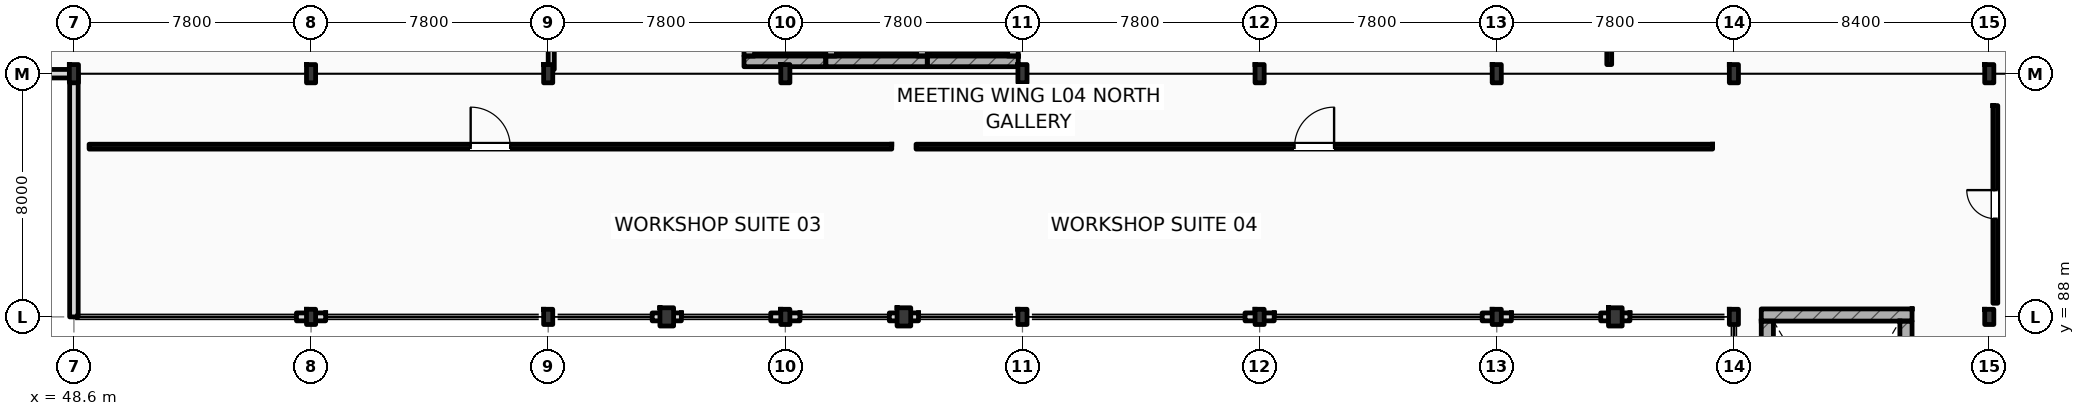
"""IFC4 building model, lengths in metres.
Left out: names, types, materials, properties, quantities, classifications, styles, units other than length and angle.
Written with IfcOpenShell. Run it as: python <this file> out.ifc"""

import sys

from ifc_helpers import new_model, si_unit, direction, frame, frame_2d, origin, origin_2d, place, context, subcontext, project, spatial, rectangle, i_section, extrude, element, fill, save


model = new_model("IFC4")
c1 = context("Model", 3, precision=1e-05, world=origin(), true_north=direction((0.0, 1.0)))
c2 = subcontext(c1, "Body", "Model", "MODEL_VIEW")
j1 = project(units=[si_unit("LENGTHUNIT", "METRE"), si_unit("PLANEANGLEUNIT", "RADIAN")], contexts=[c1])
p1 = place(None, origin())
s1 = spatial("IfcSite", under=j1, at=p1, CompositionType="ELEMENT")
p2 = place(p1, origin())
s2 = spatial("IfcBuilding", under=s1, at=p2, CompositionType="ELEMENT")
p3 = place(p2, frame((0.0, 0.0, 20.4)))
s3 = spatial("IfcBuildingStorey", under=s2, at=p3, CompositionType="ELEMENT", Elevation=20.4)
for number, where, z_axis, x_axis in (
    (1, (48.6, 96.0, 0.0), (0.0, 0.0, 1.0), (1.0, 0.0, 0.0)),
    (2, (56.4, 96.0, 0.0), (0.0, 0.0, 1.0), (1.0, 0.0, 0.0)),
    (3, (64.2, 96.0, 0.0), (0.0, 0.0, 1.0), (1.0, 0.0, 0.0)),
    (4, (72.0, 96.0, 0.0), (0.0, 0.0, 1.0), (1.0, 0.0, 0.0)),
    (5, (79.8, 96.0, 0.0), (0.0, 0.0, 1.0), (1.0, 0.0, 0.0)),
    (6, (87.6, 96.0, 0.0), (0.0, 0.0, 1.0), (1.0, 0.0, 0.0)),
    (7, (95.4, 96.0, 0.0), (0.0, 0.0, 1.0), (1.0, 0.0, 0.0)),
    (8, (103.2, 96.0, 0.0), (0.0, 0.0, 1.0), (1.0, 0.0, 0.0)),
    (9, (111.6, 96.0, 0.0), (0.0, 0.0, 1.0), (1.0, 0.0, 0.0)),
):
    element("IfcColumn", number, at=place(p3, frame(where, z_axis=z_axis, x_axis=x_axis)), inside=s3, PredefinedType="COLUMN", context=c2, shape_type="SweptSolid", body=[
        extrude(i_section(OverallWidth=0.3, OverallDepth=0.6, WebThickness=0.015, FlangeThickness=0.03, FilletRadius=0.027, at=origin_2d()), origin(), (0.0, 0.0, 1.0), 4.2),
    ])
for number, where, z_axis, x_axis in (
    (10, (56.4, 88.0, 0.0), (0.0, 0.0, 1.0), (1.0, 0.0, 0.0)),
    (11, (64.2, 88.0, 0.0), (0.0, 0.0, 1.0), (1.0, 0.0, 0.0)),
    (12, (72.0, 88.0, 0.0), (0.0, 0.0, 1.0), (1.0, 0.0, 0.0)),
    (13, (79.8, 88.0, 0.0), (0.0, 0.0, 1.0), (1.0, 0.0, 0.0)),
    (14, (87.6, 88.0, 0.0), (0.0, 0.0, 1.0), (1.0, 0.0, 0.0)),
    (15, (95.4, 88.0, 0.0), (0.0, 0.0, 1.0), (1.0, 0.0, 0.0)),
    (16, (103.2, 88.0, 0.0), (0.0, 0.0, 1.0), (1.0, 0.0, 0.0)),
    (17, (111.6, 88.0, 0.0), (0.0, 0.0, 1.0), (1.0, 0.0, 0.0)),
):
    element("IfcColumn", number, at=place(p3, frame(where, z_axis=z_axis, x_axis=x_axis)), inside=s3, PredefinedType="COLUMN", context=c2, shape_type="SweptSolid", body=[
        extrude(i_section(OverallWidth=0.3, OverallDepth=0.5, WebThickness=0.014, FlangeThickness=0.028, FilletRadius=0.027, at=origin_2d()), origin(), (0.0, 0.0, 1.0), 4.2),
    ])
for number, where, z_axis, x_axis in (
    (18, (68.1, 88.0, 0.0), (0.0, 0.0, 1.0), (1.0, 0.0, 0.0)),
    (19, (75.9, 88.0, 0.0), (0.0, 0.0, 1.0), (1.0, 0.0, 0.0)),
    (20, (99.3, 88.0, 0.0), (0.0, 0.0, 1.0), (1.0, 0.0, 0.0)),
):
    element("IfcColumn", number, at=place(p3, frame(where, z_axis=z_axis, x_axis=x_axis)), inside=s3, PredefinedType="PILASTER", context=c2, shape_type="SweptSolid", body=[
        extrude(rectangle(XDim=0.45, YDim=0.6, at=origin_2d()), origin(), (0.0, 0.0, 1.0), 4.2),
    ])
p4 = place(p3, frame((104.1, 88.062, 0.0), z_axis=(0.0, 0.0, 1.0), x_axis=(1.0, 0.0, 0.0)))
e21 = element("IfcWall", 21, at=p4, inside=s3, PredefinedType="SHEAR", context=c2, shape_type="SweptSolid", body=[
    extrude(rectangle(XDim=4.96, YDim=0.4, at=frame_2d((2.48, 0.0))), origin(), (0.0, 0.0, 1.0), 4.2),
])
p5 = place(p3, frame((104.3, 78.75, 0.0), z_axis=(0.0, 0.0, 1.0), x_axis=(0.0, 1.0, 0.0)))
e22 = element("IfcWall", 22, at=p5, inside=s3, PredefinedType="SHEAR", context=c2, shape_type="SweptSolid", body=[
    extrude(rectangle(XDim=9.112, YDim=0.4, at=frame_2d((4.556, 0.0))), origin(), (0.0, 0.0, 1.0), 4.2),
])
p6 = place(p3, frame((108.86, 78.75, 0.0), z_axis=(0.0, 0.0, 1.0), x_axis=(0.0, 1.0, 0.0)))
e23 = element("IfcWall", 23, at=p6, inside=s3, PredefinedType="SHEAR", context=c2, shape_type="SweptSolid", body=[
    extrude(rectangle(XDim=9.112, YDim=0.4, at=frame_2d((4.556, 0.0))), origin(), (0.0, 0.0, 1.0), 4.2),
])
p7 = place(p6, frame((0.44, 0.0, 0.0)))
e24 = element("IfcOpeningElement", 24, at=p7, cuts=e23, PredefinedType="OPENING", context=c2, shape_type="SweptSolid", body=[
    extrude(rectangle(XDim=1.1, YDim=2.2, at=frame_2d((0.55, 1.1))), frame((0.0, 0.21, 0.0), z_axis=(0.0, -1.0, 0.0), x_axis=(1.0, 0.0, 0.0)), (0.0, 0.0, 1.0), 0.42),
])
for number, where, z_axis, x_axis in (
    (25, (55.92, 88.0, 0.0), (0.0, 0.0, 1.0), (1.0, 0.0, 0.0)),
    (26, (67.62, 88.0, 0.0), (0.0, 0.0, 1.0), (1.0, 0.0, 0.0)),
    (27, (71.52, 88.0, 0.0), (0.0, 0.0, 1.0), (1.0, 0.0, 0.0)),
    (28, (75.42, 88.0, 0.0), (0.0, 0.0, 1.0), (1.0, 0.0, 0.0)),
    (29, (87.12, 88.0, 0.0), (0.0, 0.0, 1.0), (1.0, 0.0, 0.0)),
    (30, (94.92, 88.0, 0.0), (0.0, 0.0, 1.0), (1.0, 0.0, 0.0)),
    (31, (98.82, 88.0, 0.0), (0.0, 0.0, 1.0), (1.0, 0.0, 0.0)),
):
    element("IfcWall", number, at=place(p3, frame(where, z_axis=z_axis, x_axis=x_axis)), inside=s3, PredefinedType="STANDARD", context=c2, shape_type="SweptSolid", body=[
        extrude(rectangle(XDim=0.96, YDim=0.26, at=frame_2d((0.48, 0.0))), origin(), (0.0, 0.0, 1.0), 3.48),
    ])
p8 = place(p3, frame((48.6, 88.0, 0.0), z_axis=(0.0, 0.0, 1.0), x_axis=(0.0, 1.0, 0.0)))
e32 = element("IfcWall", 32, at=p8, inside=s3, PredefinedType="STANDARD", context=c2, shape_type="SweptSolid", body=[
    extrude(rectangle(XDim=8.0, YDim=0.28, at=frame_2d((4.0, 0.0))), origin(), (0.0, 0.0, 1.0), 3.94),
])
p9 = place(p3, frame((25.2, 96.0, 0.0), z_axis=(0.0, 0.0, 1.0), x_axis=(1.0, 0.0, 0.0)))
e33 = element("IfcWall", 33, at=p9, inside=s3, PredefinedType="STANDARD", context=c2, shape_type="SweptSolid", body=[
    extrude(rectangle(XDim=23.4, YDim=0.28, at=frame_2d((11.7, 0.0))), origin(), (0.0, 0.0, 1.0), 3.48),
])
p10 = place(p3, frame((70.64, 96.405, 0.0), z_axis=(0.0, 0.0, 1.0), x_axis=(1.0, 0.0, 0.0)))
e34 = element("IfcWall", 34, at=p10, inside=s3, PredefinedType="SHEAR", context=c2, shape_type="SweptSolid", body=[
    extrude(rectangle(XDim=2.69, YDim=0.35, at=frame_2d((1.345, 0.0))), origin(), (0.0, 0.0, 1.0), 3.94),
])
p11 = place(p3, frame((70.815, 96.58, 0.0), z_axis=(0.0, 0.0, 1.0), x_axis=(0.0, 1.0, 0.0)))
e35 = element("IfcWall", 35, at=p11, inside=s3, PredefinedType="SHEAR", context=c2, shape_type="SweptSolid", body=[
    extrude(rectangle(XDim=1.84, YDim=0.35, at=frame_2d((0.92, 0.0))), origin(), (0.0, 0.0, 1.0), 3.94),
])
p12 = place(p3, frame((73.33, 96.405, 0.0), z_axis=(0.0, 0.0, 1.0), x_axis=(1.0, 0.0, 0.0)))
e36 = element("IfcWall", 36, at=p12, inside=s3, PredefinedType="SHEAR", context=c2, shape_type="SweptSolid", body=[
    extrude(rectangle(XDim=3.34, YDim=0.35, at=frame_2d((1.67, 0.0))), origin(), (0.0, 0.0, 1.0), 3.94),
])
for number, where, z_axis, x_axis in (
    (37, (73.505, 96.58, 0.0), (0.0, 0.0, 1.0), (0.0, 1.0, 0.0)),
    (38, (76.495, 96.58, 0.0), (0.0, 0.0, 1.0), (0.0, 1.0, 0.0)),
):
    element("IfcWall", number, at=place(p3, frame(where, z_axis=z_axis, x_axis=x_axis)), inside=s3, PredefinedType="SHEAR", context=c2, shape_type="SweptSolid", body=[
        extrude(rectangle(XDim=1.84, YDim=0.35, at=frame_2d((0.92, 0.0))), origin(), (0.0, 0.0, 1.0), 3.94),
    ])
p13 = place(p3, frame((76.67, 96.405, 0.0), z_axis=(0.0, 0.0, 1.0), x_axis=(1.0, 0.0, 0.0)))
e39 = element("IfcWall", 39, at=p13, inside=s3, PredefinedType="SHEAR", context=c2, shape_type="SweptSolid", body=[
    extrude(rectangle(XDim=2.99, YDim=0.35, at=frame_2d((1.495, 0.0))), origin(), (0.0, 0.0, 1.0), 3.94),
])
p14 = place(p3, frame((79.485, 96.58, 0.0), z_axis=(0.0, 0.0, 1.0), x_axis=(0.0, 1.0, 0.0)))
e40 = element("IfcWall", 40, at=p14, inside=s3, PredefinedType="SHEAR", context=c2, shape_type="SweptSolid", body=[
    extrude(rectangle(XDim=1.84, YDim=0.35, at=frame_2d((0.92, 0.0))), origin(), (0.0, 0.0, 1.0), 3.53),
])
p15 = place(p3, frame((64.3, 96.14, 0.0), z_axis=(0.0, 0.0, 1.0), x_axis=(0.0, 1.0, 0.0)))
e41 = element("IfcWall", 41, at=p15, inside=s3, PredefinedType="PARTITIONING", context=c2, shape_type="SweptSolid", body=[
    extrude(rectangle(XDim=11.08, YDim=0.2, at=frame_2d((5.54, 0.0))), origin(), (0.0, 0.0, 1.0), 3.53),
])
p16 = place(p3, frame((99.1, 96.3, 0.0), z_axis=(0.0, 0.0, 1.0), x_axis=(0.0, 1.0, 0.0)))
e42 = element("IfcWall", 42, at=p16, inside=s3, PredefinedType="PARTITIONING", context=c2, shape_type="SweptSolid", body=[
    extrude(rectangle(XDim=10.6, YDim=0.16, at=frame_2d((5.3, 0.0))), origin(), (0.0, 0.0, 1.0), 3.94),
])
p17 = place(p3, frame((49.1, 93.6, 0.0), z_axis=(0.0, 0.0, 1.0), x_axis=(1.0, 0.0, 0.0)))
e43 = element("IfcWall", 43, at=p17, inside=s3, PredefinedType="PARTITIONING", context=c2, shape_type="SweptSolid", body=[
    extrude(rectangle(XDim=26.4, YDim=0.16, at=frame_2d((13.2, 0.0))), origin(), (0.0, 0.0, 1.0), 3.94),
])
p18 = place(p17, frame((12.55, 0.0, 0.0)))
e44 = element("IfcOpeningElement", 44, at=p18, cuts=e43, PredefinedType="OPENING", context=c2, shape_type="SweptSolid", body=[
    extrude(rectangle(XDim=1.3, YDim=2.2, at=frame_2d((0.65, 1.1))), frame((0.0, 0.09, 0.0), z_axis=(0.0, -1.0, 0.0), x_axis=(1.0, 0.0, 0.0)), (0.0, 0.0, 1.0), 0.18),
])
p19 = place(p3, frame((76.3, 93.6, 0.0), z_axis=(0.0, 0.0, 1.0), x_axis=(1.0, 0.0, 0.0)))
e45 = element("IfcWall", 45, at=p19, inside=s3, PredefinedType="PARTITIONING", context=c2, shape_type="SweptSolid", body=[
    extrude(rectangle(XDim=26.2, YDim=0.16, at=frame_2d((13.1, 0.0))), origin(), (0.0, 0.0, 1.0), 3.94),
])
p20 = place(p19, frame((12.45, 0.0, 0.0)))
e46 = element("IfcOpeningElement", 46, at=p20, cuts=e45, PredefinedType="OPENING", context=c2, shape_type="SweptSolid", body=[
    extrude(rectangle(XDim=1.3, YDim=2.2, at=frame_2d((0.65, 1.1))), frame((0.0, 0.09, 0.0), z_axis=(0.0, -1.0, 0.0), x_axis=(1.0, 0.0, 0.0)), (0.0, 0.0, 1.0), 0.18),
])
p21 = place(p3, frame((111.8, 88.45, 0.0), z_axis=(0.0, 0.0, 1.0), x_axis=(0.0, 1.0, 0.0)))
e47 = element("IfcWall", 47, at=p21, inside=s3, PredefinedType="PARTITIONING", context=c2, shape_type="SweptSolid", body=[
    extrude(rectangle(XDim=6.5, YDim=0.16, at=frame_2d((3.25, 0.0))), origin(), (0.0, 0.0, 1.0), 3.53),
])
p22 = place(p21, frame((2.78, 0.0, 0.0)))
e48 = element("IfcOpeningElement", 48, at=p22, cuts=e47, PredefinedType="OPENING", context=c2, shape_type="SweptSolid", body=[
    extrude(rectangle(XDim=0.94, YDim=2.15, at=frame_2d((0.47, 1.075))), frame((0.0, 0.09, 0.0), z_axis=(0.0, -1.0, 0.0), x_axis=(1.0, 0.0, 0.0)), (0.0, 0.0, 1.0), 0.18),
])
p23 = place(p18, origin())
e49 = element("IfcDoor", 49, at=p23, inside=s3, OperationType="SINGLE_SWING_LEFT", PredefinedType="DOOR", context=c2, shape_type="SweptSolid", body=[
    extrude(rectangle(XDim=1.3, YDim=2.2, at=frame_2d((0.65, 1.1))), frame((0.0, 0.025, 0.0), z_axis=(0.0, -1.0, 0.0), x_axis=(1.0, 0.0, 0.0)), (0.0, 0.0, 1.0), 0.05),
])
fill(e44, e49)
p24 = place(p20, origin())
e50 = element("IfcDoor", 50, at=p24, inside=s3, OperationType="SINGLE_SWING_RIGHT", PredefinedType="DOOR", context=c2, shape_type="SweptSolid", body=[
    extrude(rectangle(XDim=1.3, YDim=2.2, at=frame_2d((0.65, 1.1))), frame((0.0, 0.025, 0.0), z_axis=(0.0, -1.0, 0.0), x_axis=(1.0, 0.0, 0.0)), (0.0, 0.0, 1.0), 0.05),
])
fill(e46, e50)
p25 = place(p22, origin())
e51 = element("IfcDoor", 51, at=p25, inside=s3, OperationType="SINGLE_SWING_RIGHT", PredefinedType="DOOR", context=c2, shape_type="SweptSolid", body=[
    extrude(rectangle(XDim=0.94, YDim=2.15, at=frame_2d((0.47, 1.075))), frame((0.0, 0.025, 0.0), z_axis=(0.0, -1.0, 0.0), x_axis=(1.0, 0.0, 0.0)), (0.0, 0.0, 1.0), 0.05),
])
fill(e48, e51)
save(model, sys.argv[1])
